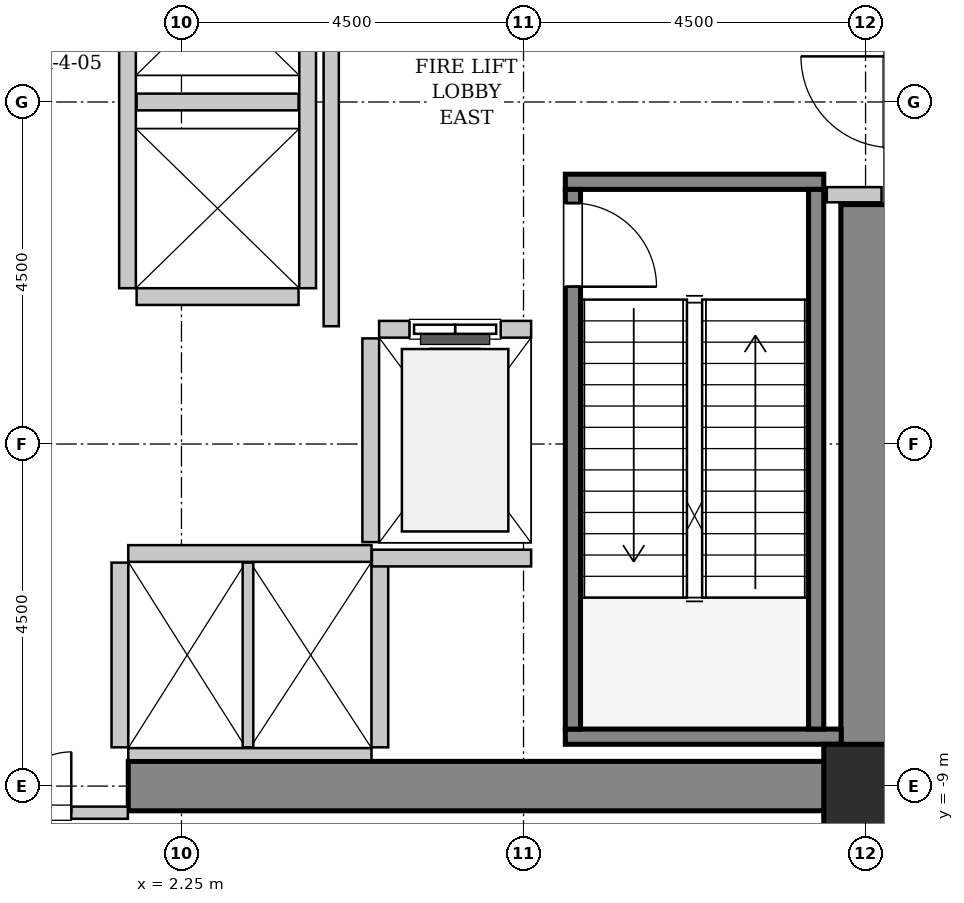
"""IFC4 building model, lengths in metres.
Left out: names, types, materials, properties, quantities, classifications, styles, units other than length and angle.
Written with IfcOpenShell. Run it as: python <this file> out.ifc"""

import sys

from ifc_helpers import new_model, si_unit, direction, frame, frame_2d, origin, origin_2d, place, context, subcontext, project, spatial, rectangle, hollow_rectangle, extrude, source, transform, mapped, element, fill, save


model = new_model("IFC4")
c1 = context("Model", 3, precision=1e-05, world=origin(), true_north=direction((0.0, 1.0)))
c2 = subcontext(c1, "Body", "Model", "MODEL_VIEW")
j1 = project(units=[si_unit("LENGTHUNIT", "METRE"), si_unit("PLANEANGLEUNIT", "RADIAN")], contexts=[c1])
p1 = place(None, origin())
s1 = spatial("IfcSite", under=j1, at=p1, CompositionType="ELEMENT")
p2 = place(p1, origin())
s2 = spatial("IfcBuilding", under=s1, at=p2, CompositionType="ELEMENT")
p3 = place(p2, frame((0.0, 0.0, 27.6)))
s3 = spatial("IfcBuildingStorey", under=s2, at=p3, CompositionType="ELEMENT", Elevation=27.6)
m1 = source(origin(), c2, "Body", "SweptSolid", [
    extrude(rectangle(XDim=10.025, YDim=0.65, at=frame_2d((5.012, 0.0))), origin(), (0.0, 0.0, 1.0), 5.4),
])
p4 = place(p3, frame((1.55, -9.0, 0.0), z_axis=(0.0, 0.0, 1.0), x_axis=(1.0, 0.0, 0.0)))
e1 = element("IfcWall", 1, at=p4, inside=s3, PredefinedType="SHEAR", context=c2, shape_type="MappedRepresentation", body=[
    mapped(m1, transform((0.0, 0.0, 0.0), x_axis=(1.0, 0.0, 0.0), y_axis=(0.0, 1.0, 0.0), z_axis=(0.0, 0.0, 1.0), scale=1.0)),
])
m2 = source(origin(), c2, "Body", "SweptSolid", [
    extrude(rectangle(XDim=7.325, YDim=0.65, at=frame_2d((3.663, 0.0))), origin(), (0.0, 0.0, 1.0), 5.4),
])
p5 = place(p3, frame((11.25, -8.675, 0.0), z_axis=(0.0, 0.0, 1.0), x_axis=(0.0, 1.0, 0.0)))
e2 = element("IfcWall", 2, at=p5, inside=s3, PredefinedType="SHEAR", context=c2, shape_type="MappedRepresentation", body=[
    mapped(m2, transform((0.0, 0.0, 0.0), x_axis=(1.0, 0.0, 0.0), y_axis=(0.0, 1.0, 0.0), z_axis=(0.0, 0.0, 1.0), scale=1.0)),
])
m3 = source(origin(), c2, "Body", "SweptSolid", [
    extrude(hollow_rectangle(XDim=1.1, YDim=1.1, WallThickness=0.055, InnerFilletRadius=0.055, OuterFilletRadius=0.11, at=origin_2d()), origin(), (0.0, 0.0, 1.0), 5.4),
])
p6 = place(p3, frame((11.25, -9.0, 0.0), z_axis=(0.0, 0.0, 1.0), x_axis=(1.0, 0.0, 0.0)))
e3 = element("IfcColumn", 3, at=p6, inside=s3, PredefinedType="COLUMN", context=c2, shape_type="MappedRepresentation", body=[
    mapped(m3, transform((0.0, 0.0, 0.0), x_axis=(1.0, 0.0, 0.0), y_axis=(0.0, 1.0, 0.0), z_axis=(0.0, 0.0, 1.0), scale=1.0)),
])
m4 = source(origin(), c2, "Body", "SweptSolid", [
    extrude(rectangle(XDim=3.4, YDim=0.2, at=frame_2d((1.7, 0.0))), origin(), (0.0, 0.0, 1.0), 5.4),
])
p7 = place(p3, frame((7.3, -1.05, 0.0), z_axis=(0.0, 0.0, 1.0), x_axis=(1.0, 0.0, 0.0)))
e4 = element("IfcWall", 4, at=p7, inside=s3, PredefinedType="SOLIDWALL", context=c2, shape_type="MappedRepresentation", body=[
    mapped(m4, transform((0.0, 0.0, 0.0), x_axis=(1.0, 0.0, 0.0), y_axis=(0.0, 1.0, 0.0), z_axis=(0.0, 0.0, 1.0), scale=1.0)),
])
m5 = source(origin(), c2, "Body", "SweptSolid", [
    extrude(rectangle(XDim=3.63, YDim=0.2, at=frame_2d((1.815, 0.0))), origin(), (0.0, 0.0, 1.0), 5.4),
])
p8 = place(p3, frame((7.3, -8.35, 0.0), z_axis=(0.0, 0.0, 1.0), x_axis=(1.0, 0.0, 0.0)))
e5 = element("IfcWall", 5, at=p8, inside=s3, PredefinedType="SOLIDWALL", context=c2, shape_type="MappedRepresentation", body=[
    mapped(m5, transform((0.0, 0.0, 0.0), x_axis=(1.0, 0.0, 0.0), y_axis=(0.0, 1.0, 0.0), z_axis=(0.0, 0.0, 1.0), scale=1.0)),
])
m6 = source(origin(), c2, "Body", "SweptSolid", [
    extrude(rectangle(XDim=7.1, YDim=0.2, at=frame_2d((3.55, 0.0))), origin(), (0.0, 0.0, 1.0), 5.4),
])
p9 = place(p3, frame((7.4, -1.15, 0.0), z_axis=(0.0, 0.0, 1.0), x_axis=(0.0, -1.0, 0.0)))
e6 = element("IfcWall", 6, at=p9, inside=s3, PredefinedType="SOLIDWALL", context=c2, shape_type="MappedRepresentation", body=[
    mapped(m6, transform((0.0, 0.0, 0.0), x_axis=(1.0, 0.0, 0.0), y_axis=(0.0, 1.0, 0.0), z_axis=(0.0, 0.0, 1.0), scale=1.0)),
])
p10 = place(p9, frame((0.18, 0.0, 0.0)))
e7 = element("IfcOpeningElement", 7, at=p10, cuts=e6, PredefinedType="OPENING", context=c2, shape_type="SweptSolid", body=[
    extrude(rectangle(XDim=1.1, YDim=2.15, at=frame_2d((0.55, 1.075))), frame((0.0, 0.11, 0.0), z_axis=(0.0, -1.0, 0.0), x_axis=(1.0, 0.0, 0.0)), (0.0, 0.0, 1.0), 0.22),
])
p11 = place(p3, frame((10.6, -1.15, 0.0), z_axis=(0.0, 0.0, 1.0), x_axis=(0.0, -1.0, 0.0)))
e8 = element("IfcWall", 8, at=p11, inside=s3, PredefinedType="SOLIDWALL", context=c2, shape_type="MappedRepresentation", body=[
    mapped(m6, transform((0.0, 0.0, 0.0), x_axis=(1.0, 0.0, 0.0), y_axis=(0.0, 1.0, 0.0), z_axis=(0.0, 0.0, 1.0), scale=1.0)),
])
m7 = source(origin(), c2, "Body", "SweptSolid", [
    extrude(rectangle(XDim=2.0, YDim=0.22, at=frame_2d((1.0, 0.0))), origin(), (0.0, 0.0, 1.0), 5.135),
])
p12 = place(p3, frame((6.85, -2.99, 0.0), z_axis=(0.0, 0.0, 1.0), x_axis=(-1.0, 0.0, 0.0)))
e9 = element("IfcWall", 9, at=p12, inside=s3, PredefinedType="SOLIDWALL", context=c2, shape_type="MappedRepresentation", body=[
    mapped(m7, transform((0.0, 0.0, 0.0), x_axis=(1.0, 0.0, 0.0), y_axis=(0.0, 1.0, 0.0), z_axis=(0.0, 0.0, 1.0), scale=1.0)),
])
p13 = place(p12, frame((0.4, 0.0, 0.0)))
e10 = element("IfcOpeningElement", 10, at=p13, cuts=e9, PredefinedType="OPENING", context=c2, shape_type="SweptSolid", body=[
    extrude(rectangle(XDim=1.2, YDim=2.2, at=frame_2d((0.6, 1.1))), frame((0.0, 0.12, 0.0), z_axis=(0.0, -1.0, 0.0), x_axis=(1.0, 0.0, 0.0)), (0.0, 0.0, 1.0), 0.24),
])
m8 = source(origin(), c2, "Body", "SweptSolid", [
    extrude(rectangle(XDim=2.68, YDim=0.22, at=frame_2d((1.34, 0.0))), origin(), (0.0, 0.0, 1.0), 5.135),
])
p14 = place(p3, frame((4.74, -3.11, 0.0), z_axis=(0.0, 0.0, 1.0), x_axis=(0.0, -1.0, 0.0)))
e11 = element("IfcWall", 11, at=p14, inside=s3, PredefinedType="SOLIDWALL", context=c2, shape_type="MappedRepresentation", body=[
    mapped(m8, transform((0.0, 0.0, 0.0), x_axis=(1.0, 0.0, 0.0), y_axis=(0.0, 1.0, 0.0), z_axis=(0.0, 0.0, 1.0), scale=1.0)),
])
m9 = source(origin(), c2, "Body", "SweptSolid", [
    extrude(rectangle(XDim=3.2, YDim=0.22, at=frame_2d((1.6, 0.0))), origin(), (0.0, 0.0, 1.0), 5.135),
])
p15 = place(p3, frame((4.75, -5.94, 0.0), z_axis=(0.0, 0.0, 1.0), x_axis=(-1.0, 0.0, 0.0)))
e12 = element("IfcWall", 12, at=p15, inside=s3, PredefinedType="SOLIDWALL", context=c2, shape_type="MappedRepresentation", body=[
    mapped(m9, transform((0.0, 0.0, 0.0), x_axis=(1.0, 0.0, 0.0), y_axis=(0.0, 1.0, 0.0), z_axis=(0.0, 0.0, 1.0), scale=1.0)),
])
m10 = source(origin(), c2, "Body", "SweptSolid", [
    extrude(rectangle(XDim=3.2, YDim=0.16, at=frame_2d((1.6, 0.0))), origin(), (0.0, 0.0, 1.0), 4.025),
])
p16 = place(p3, frame((1.55, -8.58, 0.0), z_axis=(0.0, 0.0, 1.0), x_axis=(1.0, 0.0, 0.0)))
e13 = element("IfcWall", 13, at=p16, inside=s3, PredefinedType="PARTITIONING", context=c2, shape_type="MappedRepresentation", body=[
    mapped(m10, transform((0.0, 0.0, 0.0), x_axis=(1.0, 0.0, 0.0), y_axis=(0.0, 1.0, 0.0), z_axis=(0.0, 0.0, 1.0), scale=1.0)),
])
m11 = source(origin(), c2, "Body", "SweptSolid", [
    extrude(rectangle(XDim=2.43, YDim=0.22, at=frame_2d((1.215, 0.0))), origin(), (0.0, 0.0, 1.0), 5.135),
])
p17 = place(p3, frame((1.44, -6.06, 0.0), z_axis=(0.0, 0.0, 1.0), x_axis=(0.0, -1.0, 0.0)))
e14 = element("IfcWall", 14, at=p17, inside=s3, PredefinedType="SOLIDWALL", context=c2, shape_type="MappedRepresentation", body=[
    mapped(m11, transform((0.0, 0.0, 0.0), x_axis=(1.0, 0.0, 0.0), y_axis=(0.0, 1.0, 0.0), z_axis=(0.0, 0.0, 1.0), scale=1.0)),
])
m12 = source(origin(), c2, "Body", "SweptSolid", [
    extrude(rectangle(XDim=2.43, YDim=0.14, at=frame_2d((1.215, 0.0))), origin(), (0.0, 0.0, 1.0), 5.135),
])
p18 = place(p3, frame((3.125, -8.49, 0.0), z_axis=(0.0, 0.0, 1.0), x_axis=(0.0, 1.0, 0.0)))
e15 = element("IfcWall", 15, at=p18, inside=s3, PredefinedType="PARTITIONING", context=c2, shape_type="MappedRepresentation", body=[
    mapped(m12, transform((0.0, 0.0, 0.0), x_axis=(1.0, 0.0, 0.0), y_axis=(0.0, 1.0, 0.0), z_axis=(0.0, 0.0, 1.0), scale=1.0)),
])
p19 = place(p3, frame((4.86, -8.49, 0.0), z_axis=(0.0, 0.0, 1.0), x_axis=(0.0, 1.0, 0.0)))
e16 = element("IfcWall", 16, at=p19, inside=s3, PredefinedType="SOLIDWALL", context=c2, shape_type="MappedRepresentation", body=[
    mapped(m11, transform((0.0, 0.0, 0.0), x_axis=(1.0, 0.0, 0.0), y_axis=(0.0, 1.0, 0.0), z_axis=(0.0, 0.0, 1.0), scale=1.0)),
])
m13 = source(origin(), c2, "Body", "SweptSolid", [
    extrude(rectangle(XDim=4.9, YDim=0.22, at=frame_2d((2.45, 0.0))), origin(), (0.0, 0.0, 1.0), 5.135),
])
for number, where, z_axis, x_axis in (
    (17, (1.54, 2.45, 0.0), (0.0, 0.0, 1.0), (0.0, -1.0, 0.0)),
    (18, (3.91, -2.45, 0.0), (0.0, 0.0, 1.0), (0.0, 1.0, 0.0)),
):
    element("IfcWall", number, at=place(p3, frame(where, z_axis=z_axis, x_axis=x_axis)), inside=s3, PredefinedType="SOLIDWALL", context=c2, shape_type="MappedRepresentation", body=[
        mapped(m13, transform((0.0, 0.0, 0.0), x_axis=(1.0, 0.0, 0.0), y_axis=(0.0, 1.0, 0.0), z_axis=(0.0, 0.0, 1.0), scale=1.0)),
    ])
m14 = source(origin(), c2, "Body", "SweptSolid", [
    extrude(rectangle(XDim=2.13, YDim=0.22, at=frame_2d((1.065, 0.0))), origin(), (0.0, 0.0, 1.0), 5.135),
])
for number, where, z_axis, x_axis in (
    (19, (1.66, -2.56, 0.0), (0.0, 0.0, 1.0), (1.0, 0.0, 0.0)),
    (20, (1.66, 0.0, 0.0), (0.0, 0.0, 1.0), (1.0, 0.0, 0.0)),
):
    element("IfcWall", number, at=place(p3, frame(where, z_axis=z_axis, x_axis=x_axis)), inside=s3, PredefinedType="SOLIDWALL", context=c2, shape_type="MappedRepresentation", body=[
        mapped(m14, transform((0.0, 0.0, 0.0), x_axis=(1.0, 0.0, 0.0), y_axis=(0.0, 1.0, 0.0), z_axis=(0.0, 0.0, 1.0), scale=1.0)),
    ])
m15 = source(origin(), c2, "Body", "SweptSolid", [
    extrude(rectangle(XDim=2.095, YDim=0.22, at=frame_2d((1.048, 0.0))), origin(), (0.0, 0.0, 1.0), 5.135),
])
p20 = place(p3, frame((4.755, -6.0, 0.0), z_axis=(0.0, 0.0, 1.0), x_axis=(1.0, 0.0, 0.0)))
e21 = element("IfcWall", 21, at=p20, inside=s3, PredefinedType="SOLIDWALL", context=c2, shape_type="MappedRepresentation", body=[
    mapped(m15, transform((0.0, 0.0, 0.0), x_axis=(1.0, 0.0, 0.0), y_axis=(0.0, 1.0, 0.0), z_axis=(0.0, 0.0, 1.0), scale=1.0)),
])
m16 = source(origin(), c2, "Body", "SweptSolid", [
    extrude(rectangle(XDim=5.9, YDim=0.2, at=frame_2d((2.95, 0.0))), origin(), (0.0, 0.0, 1.0), 5.135),
])
p21 = place(p3, frame((4.22, -2.95, 0.0), z_axis=(0.0, 0.0, 1.0), x_axis=(0.0, 1.0, 0.0)))
e22 = element("IfcWall", 22, at=p21, inside=s3, PredefinedType="PARTITIONING", context=c2, shape_type="MappedRepresentation", body=[
    mapped(m16, transform((0.0, 0.0, 0.0), x_axis=(1.0, 0.0, 0.0), y_axis=(0.0, 1.0, 0.0), z_axis=(0.0, 0.0, 1.0), scale=1.0)),
])
m17 = source(origin(), c2, "Body", "SweptSolid", [
    extrude(rectangle(XDim=0.72, YDim=0.2, at=frame_2d((0.36, 0.0))), origin(), (0.0, 0.0, 1.0), 5.135),
])
p22 = place(p3, frame((10.74, -1.22, 0.0), z_axis=(0.0, 0.0, 1.0), x_axis=(1.0, 0.0, 0.0)))
e23 = element("IfcWall", 23, at=p22, inside=s3, PredefinedType="PARTITIONING", context=c2, shape_type="MappedRepresentation", body=[
    mapped(m17, transform((0.0, 0.0, 0.0), x_axis=(1.0, 0.0, 0.0), y_axis=(0.0, 1.0, 0.0), z_axis=(0.0, 0.0, 1.0), scale=1.0)),
])
m18 = source(origin(), c2, "Body", "SweptSolid", [
    extrude(rectangle(XDim=3.09, YDim=0.16, at=frame_2d((1.545, 0.0))), origin(), (0.0, 0.0, 1.0), 4.025),
])
p23 = place(p3, frame((-1.545, -9.35, 0.0), z_axis=(0.0, 0.0, 1.0), x_axis=(1.0, 0.0, 0.0)))
e24 = element("IfcWall", 24, at=p23, inside=s3, PredefinedType="PARTITIONING", context=c2, shape_type="MappedRepresentation", body=[
    mapped(m18, transform((0.0, 0.0, 0.0), x_axis=(1.0, 0.0, 0.0), y_axis=(0.0, 1.0, 0.0), z_axis=(0.0, 0.0, 1.0), scale=1.0)),
])
p24 = place(p23, frame((0.745, 0.0, 0.0)))
e25 = element("IfcOpeningElement", 25, at=p24, cuts=e24, PredefinedType="OPENING", context=c2, shape_type="SweptSolid", body=[
    extrude(rectangle(XDim=1.6, YDim=2.3, at=frame_2d((0.8, 1.15))), frame((0.0, 0.09, 0.0), z_axis=(0.0, -1.0, 0.0), x_axis=(1.0, 0.0, 0.0)), (0.0, 0.0, 1.0), 0.18),
])
m19 = source(origin(), c2, "Body", "SweptSolid", [
    extrude(rectangle(XDim=1.1, YDim=2.15, at=frame_2d((0.55, 1.075))), frame((0.0, 0.025, 0.0), z_axis=(0.0, -1.0, 0.0), x_axis=(1.0, 0.0, 0.0)), (0.0, 0.0, 1.0), 0.05),
])
p25 = place(p10, origin())
e26 = element("IfcDoor", 26, at=p25, inside=s3, OperationType="SINGLE_SWING_RIGHT", PredefinedType="DOOR", context=c2, shape_type="MappedRepresentation", body=[
    mapped(m19, transform((0.0, 0.0, 0.0), x_axis=(1.0, 0.0, 0.0), y_axis=(0.0, 1.0, 0.0), z_axis=(0.0, 0.0, 1.0), scale=1.0)),
])
fill(e7, e26)
m20 = source(origin(), c2, "Body", "SweptSolid", [
    extrude(rectangle(XDim=1.2, YDim=2.2, at=frame_2d((0.6, 1.1))), frame((0.0, 0.025, 0.0), z_axis=(0.0, -1.0, 0.0), x_axis=(1.0, 0.0, 0.0)), (0.0, 0.0, 1.0), 0.05),
])
p26 = place(p13, origin())
e27 = element("IfcDoor", 27, at=p26, inside=s3, OperationType="SLIDING_TO_LEFT", PredefinedType="DOOR", context=c2, shape_type="MappedRepresentation", body=[
    mapped(m20, transform((0.0, 0.0, 0.0), x_axis=(1.0, 0.0, 0.0), y_axis=(0.0, 1.0, 0.0), z_axis=(0.0, 0.0, 1.0), scale=1.0)),
])
fill(e10, e27)
m21 = source(origin(), c2, "Body", "SweptSolid", [
    extrude(rectangle(XDim=1.6, YDim=2.3, at=frame_2d((0.8, 1.15))), frame((0.0, 0.025, 0.0), z_axis=(0.0, -1.0, 0.0), x_axis=(1.0, 0.0, 0.0)), (0.0, 0.0, 1.0), 0.05),
])
p27 = place(p24, origin())
e28 = element("IfcDoor", 28, at=p27, inside=s3, OperationType="DOUBLE_DOOR_SINGLE_SWING", PredefinedType="DOOR", context=c2, shape_type="MappedRepresentation", body=[
    mapped(m21, transform((0.0, 0.0, 0.0), x_axis=(1.0, 0.0, 0.0), y_axis=(0.0, 1.0, 0.0), z_axis=(0.0, 0.0, 1.0), scale=1.0)),
])
fill(e25, e28)
save(model, sys.argv[1])
